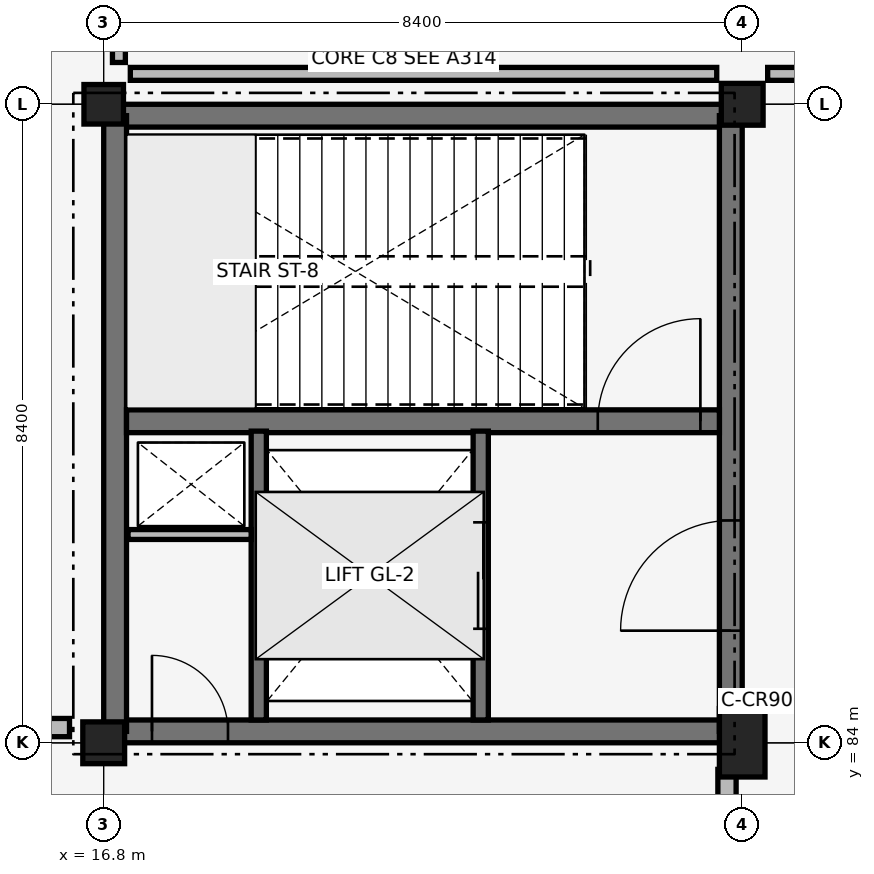
"""IFC4 building model, lengths in metres.
Left out: names, types, materials, properties, quantities, classifications, styles, units other than length and angle.
Written with IfcOpenShell. Run it as: python <this file> out.ifc"""

import sys

from ifc_helpers import new_model, si_unit, direction, frame, frame_2d, origin, origin_2d, place, context, subcontext, project, spatial, rectangle, extrude, element, fill, save


model = new_model("IFC4")
c1 = context("Model", 3, precision=1e-05, world=origin(), true_north=direction((0.0, 1.0)))
c2 = subcontext(c1, "Body", "Model", "MODEL_VIEW")
j1 = project(units=[si_unit("LENGTHUNIT", "METRE"), si_unit("PLANEANGLEUNIT", "RADIAN")], contexts=[c1])
p1 = place(None, origin())
s1 = spatial("IfcSite", under=j1, at=p1, CompositionType="ELEMENT")
p2 = place(p1, origin())
s2 = spatial("IfcBuilding", under=s1, at=p2, CompositionType="ELEMENT")
p3 = place(p2, origin())
s3 = spatial("IfcBuildingStorey", under=s2, at=p3, CompositionType="ELEMENT", Elevation=0.0)
p4 = place(p3, frame((16.95, 84.15, 0.0), z_axis=(0.0, 0.0, 1.0), x_axis=(1.0, 0.0, 0.0)))
e1 = element("IfcWall", 1, at=p4, inside=s3, PredefinedType="SHEAR", context=c2, shape_type="SweptSolid", body=[
    extrude(rectangle(XDim=8.1, YDim=0.3, at=frame_2d((4.05, 0.0))), origin(), (0.0, 0.0, 1.0), 5.14),
])
p5 = place(p4, frame((0.485, 0.0, 0.0)))
e2 = element("IfcOpeningElement", 2, at=p5, cuts=e1, PredefinedType="OPENING", context=c2, shape_type="SweptSolid", body=[
    extrude(rectangle(XDim=1.0, YDim=2.15, at=frame_2d((0.5, 1.075))), frame((0.0, 0.16, 0.0), z_axis=(0.0, -1.0, 0.0), x_axis=(1.0, 0.0, 0.0)), (0.0, 0.0, 1.0), 0.32),
])
for number, where, z_axis, x_axis in (
    (3, (16.95, 92.25, 0.0), (0.0, 0.0, 1.0), (1.0, 0.0, 0.0)),
    (4, (16.95, 84.15, 0.0), (0.0, 0.0, 1.0), (0.0, 1.0, 0.0)),
):
    element("IfcWall", number, at=place(p3, frame(where, z_axis=z_axis, x_axis=x_axis)), inside=s3, PredefinedType="SHEAR", context=c2, shape_type="SweptSolid", body=[
        extrude(rectangle(XDim=8.1, YDim=0.3, at=frame_2d((4.05, 0.0))), origin(), (0.0, 0.0, 1.0), 5.14),
    ])
p6 = place(p3, frame((25.05, 84.15, 0.0), z_axis=(0.0, 0.0, 1.0), x_axis=(0.0, 1.0, 0.0)))
e5 = element("IfcWall", 5, at=p6, inside=s3, PredefinedType="SHEAR", context=c2, shape_type="SweptSolid", body=[
    extrude(rectangle(XDim=8.1, YDim=0.3, at=frame_2d((4.05, 0.0))), origin(), (0.0, 0.0, 1.0), 5.14),
])
p7 = place(p6, frame((1.325, 0.0, 0.0)))
e6 = element("IfcOpeningElement", 6, at=p7, cuts=e5, PredefinedType="OPENING", context=c2, shape_type="SweptSolid", body=[
    extrude(rectangle(XDim=1.45, YDim=2.15, at=frame_2d((0.725, 1.075))), frame((0.0, 0.16, 0.0), z_axis=(0.0, -1.0, 0.0), x_axis=(1.0, 0.0, 0.0)), (0.0, 0.0, 1.0), 0.32),
])
p8 = place(p3, frame((17.1, 88.23, 0.0), z_axis=(0.0, 0.0, 1.0), x_axis=(1.0, 0.0, 0.0)))
e7 = element("IfcWall", 7, at=p8, inside=s3, PredefinedType="SHEAR", context=c2, shape_type="SweptSolid", body=[
    extrude(rectangle(XDim=7.8, YDim=0.3, at=frame_2d((3.9, 0.0))), origin(), (0.0, 0.0, 1.0), 5.14),
])
p9 = place(p8, frame((6.2, 0.0, 0.0)))
e8 = element("IfcOpeningElement", 8, at=p9, cuts=e7, PredefinedType="OPENING", context=c2, shape_type="SweptSolid", body=[
    extrude(rectangle(XDim=1.35, YDim=2.15, at=frame_2d((0.675, 1.075))), frame((0.0, 0.16, 0.0), z_axis=(0.0, -1.0, 0.0), x_axis=(1.0, 0.0, 0.0)), (0.0, 0.0, 1.0), 0.32),
])
p10 = place(p3, frame((16.8, 84.0, 0.0), z_axis=(0.0, 0.0, 1.0), x_axis=(1.0, 0.0, 0.0)))
e9 = element("IfcColumn", 9, at=p10, inside=s3, PredefinedType="COLUMN", context=c2, shape_type="SweptSolid", body=[
    extrude(rectangle(XDim=0.55, YDim=0.55, at=origin_2d()), origin(), (0.0, 0.0, 1.0), 5.14),
])
p11 = place(p3, frame((16.8, 92.4, 0.0), z_axis=(0.0, 0.0, 1.0), x_axis=(1.0, 0.0, 0.0)))
e10 = element("IfcColumn", 10, at=p11, inside=s3, PredefinedType="COLUMN", context=c2, shape_type="SweptSolid", body=[
    extrude(rectangle(XDim=0.52, YDim=0.52, at=origin_2d()), origin(), (0.0, 0.0, 1.0), 5.14),
])
p12 = place(p3, frame((25.2, 84.0, 0.0), z_axis=(0.0, 0.0, 1.0), x_axis=(1.0, 0.0, 0.0)))
e11 = element("IfcColumn", 11, at=p12, inside=s3, PredefinedType="COLUMN", context=c2, shape_type="SweptSolid", body=[
    extrude(rectangle(XDim=0.6, YDim=0.9, at=origin_2d()), origin(), (0.0, 0.0, 1.0), 5.14),
])
p13 = place(p3, frame((25.2, 92.4, 0.0), z_axis=(0.0, 0.0, 1.0), x_axis=(1.0, 0.0, 0.0)))
e12 = element("IfcColumn", 12, at=p13, inside=s3, PredefinedType="COLUMN", context=c2, shape_type="SweptSolid", body=[
    extrude(rectangle(XDim=0.55, YDim=0.55, at=origin_2d()), origin(), (0.0, 0.0, 1.0), 5.14),
])
p14 = place(p3, frame((21.76, 84.3, 0.0), z_axis=(0.0, 0.0, 1.0), x_axis=(0.0, 1.0, 0.0)))
e13 = element("IfcWall", 13, at=p14, inside=s3, PredefinedType="SHEAR", context=c2, shape_type="SweptSolid", body=[
    extrude(rectangle(XDim=3.8, YDim=0.2, at=frame_2d((1.9, 0.0))), origin(), (0.0, 0.0, 1.0), 4.36),
])
p15 = place(p14, frame((1.2, 0.0, 0.0)))
e14 = element("IfcOpeningElement", 14, at=p15, cuts=e13, PredefinedType="OPENING", context=c2, shape_type="SweptSolid", body=[
    extrude(rectangle(XDim=1.4, YDim=2.2, at=frame_2d((0.7, 1.1))), frame((0.0, 0.11, 0.0), z_axis=(0.0, -1.0, 0.0), x_axis=(1.0, 0.0, 0.0)), (0.0, 0.0, 1.0), 0.22),
])
p16 = place(p3, frame((18.84, 84.3, 0.0), z_axis=(0.0, 0.0, 1.0), x_axis=(0.0, 1.0, 0.0)))
e15 = element("IfcWall", 15, at=p16, inside=s3, PredefinedType="SHEAR", context=c2, shape_type="SweptSolid", body=[
    extrude(rectangle(XDim=3.8, YDim=0.2, at=frame_2d((1.9, 0.0))), origin(), (0.0, 0.0, 1.0), 4.36),
])
p17 = place(p3, frame((17.12, 86.74, 0.0), z_axis=(0.0, 0.0, 1.0), x_axis=(1.0, 0.0, 0.0)))
e16 = element("IfcWall", 16, at=p17, inside=s3, PredefinedType="PARTITIONING", context=c2, shape_type="SweptSolid", body=[
    extrude(rectangle(XDim=1.62, YDim=0.13, at=frame_2d((0.81, 0.0))), origin(), (0.0, 0.0, 1.0), 5.14),
])
p18 = place(p3, frame((25.0, 76.11, 0.0), z_axis=(0.0, 0.0, 1.0), x_axis=(0.0, 1.0, 0.0)))
e17 = element("IfcWall", 17, at=p18, inside=s3, PredefinedType="PARTITIONING", context=c2, shape_type="SweptSolid", body=[
    extrude(rectangle(XDim=7.54, YDim=0.24, at=frame_2d((3.77, 0.0))), origin(), (0.0, 0.0, 1.0), 4.35),
])
p19 = place(p3, frame((8.71, 84.2, 0.0), z_axis=(0.0, 0.0, 1.0), x_axis=(1.0, 0.0, 0.0)))
e18 = element("IfcWall", 18, at=p19, inside=s3, PredefinedType="PARTITIONING", context=c2, shape_type="SweptSolid", body=[
    extrude(rectangle(XDim=7.64, YDim=0.24, at=frame_2d((3.82, 0.0))), origin(), (0.0, 0.0, 1.0), 4.36),
])
p20 = place(p3, frame((17.15, 92.8, 0.0), z_axis=(0.0, 0.0, 1.0), x_axis=(1.0, 0.0, 0.0)))
e19 = element("IfcWall", 19, at=p20, inside=s3, PredefinedType="PARTITIONING", context=c2, shape_type="SweptSolid", body=[
    extrude(rectangle(XDim=7.715, YDim=0.17, at=frame_2d((3.857, 0.0))), origin(), (0.0, 0.0, 1.0), 5.14),
])
p21 = place(p3, frame((25.535, 92.8, 0.0), z_axis=(0.0, 0.0, 1.0), x_axis=(1.0, 0.0, 0.0)))
e20 = element("IfcWall", 20, at=p21, inside=s3, PredefinedType="PARTITIONING", context=c2, shape_type="SweptSolid", body=[
    extrude(rectangle(XDim=7.785, YDim=0.17, at=frame_2d((3.893, 0.0))), origin(), (0.0, 0.0, 1.0), 4.35),
])
p22 = place(p21, frame((3.343, 0.0, 0.0)))
e21 = element("IfcOpeningElement", 21, at=p22, cuts=e20, PredefinedType="OPENING", context=c2, shape_type="SweptSolid", body=[
    extrude(rectangle(XDim=1.1, YDim=2.15, at=frame_2d((0.55, 1.075))), frame((0.0, 0.095, 0.0), z_axis=(0.0, -1.0, 0.0), x_axis=(1.0, 0.0, 0.0)), (0.0, 0.0, 1.0), 0.19),
])
p23 = place(p3, frame((17.0, 92.95, 0.0), z_axis=(0.0, 0.0, 1.0), x_axis=(0.0, 1.0, 0.0)))
e22 = element("IfcWall", 22, at=p23, inside=s3, PredefinedType="PARTITIONING", context=c2, shape_type="SweptSolid", body=[
    extrude(rectangle(XDim=7.515, YDim=0.17, at=frame_2d((3.758, 0.0))), origin(), (0.0, 0.0, 1.0), 4.32),
])
p24 = place(p9, origin())
e23 = element("IfcDoor", 23, at=p24, inside=s3, OperationType="SINGLE_SWING_RIGHT", PredefinedType="DOOR", context=c2, shape_type="SweptSolid", body=[
    extrude(rectangle(XDim=1.35, YDim=2.15, at=frame_2d((0.675, 1.075))), frame((0.0, 0.025, 0.0), z_axis=(0.0, -1.0, 0.0), x_axis=(1.0, 0.0, 0.0)), (0.0, 0.0, 1.0), 0.05),
])
fill(e8, e23)
p25 = place(p15, origin())
e24 = element("IfcDoor", 24, at=p25, inside=s3, OperationType="SLIDING_TO_LEFT", PredefinedType="DOOR", context=c2, shape_type="SweptSolid", body=[
    extrude(rectangle(XDim=1.4, YDim=2.2, at=frame_2d((0.7, 1.1))), frame((0.0, 0.025, 0.0), z_axis=(0.0, -1.0, 0.0), x_axis=(1.0, 0.0, 0.0)), (0.0, 0.0, 1.0), 0.05),
])
fill(e14, e24)
p26 = place(p7, origin())
e25 = element("IfcDoor", 25, at=p26, inside=s3, OperationType="DOUBLE_DOOR_SINGLE_SWING", PredefinedType="DOOR", context=c2, shape_type="SweptSolid", body=[
    extrude(rectangle(XDim=1.45, YDim=2.15, at=frame_2d((0.725, 1.075))), frame((0.0, 0.025, 0.0), z_axis=(0.0, -1.0, 0.0), x_axis=(1.0, 0.0, 0.0)), (0.0, 0.0, 1.0), 0.05),
])
fill(e6, e25)
p27 = place(p5, origin())
e26 = element("IfcDoor", 26, at=p27, inside=s3, OperationType="SINGLE_SWING_LEFT", PredefinedType="DOOR", context=c2, shape_type="SweptSolid", body=[
    extrude(rectangle(XDim=1.0, YDim=2.15, at=frame_2d((0.5, 1.075))), frame((0.0, 0.025, 0.0), z_axis=(0.0, -1.0, 0.0), x_axis=(1.0, 0.0, 0.0)), (0.0, 0.0, 1.0), 0.05),
])
fill(e2, e26)
save(model, sys.argv[1])
